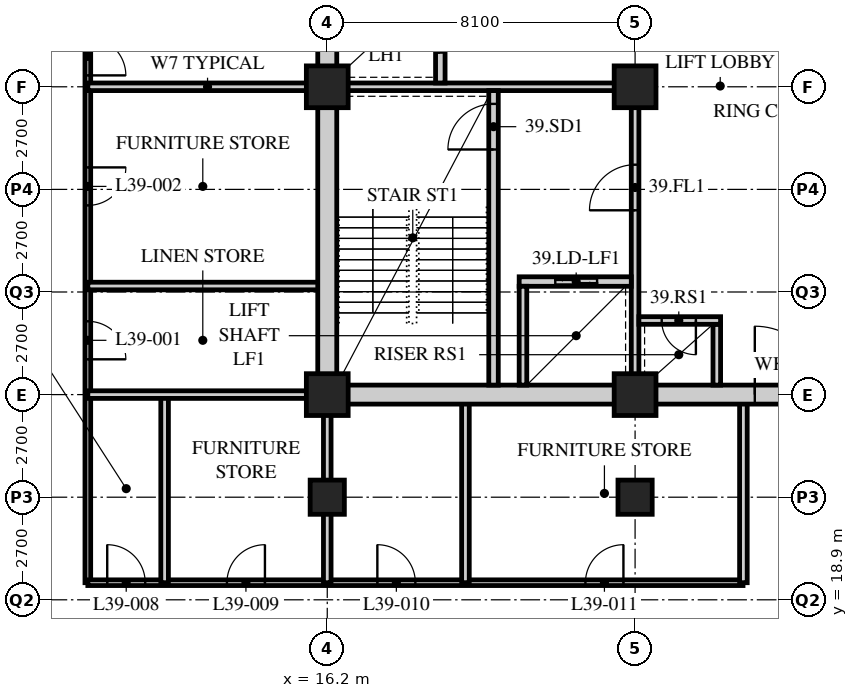
"""IFC4 building model, lengths in metres.
Left out: names, types, materials, properties, quantities, classifications, styles, units other than length and angle.
Written with IfcOpenShell. Run it as: python <this file> out.ifc"""

import sys

from ifc_helpers import new_model, si_unit, direction, frame, frame_2d, origin, origin_2d, place, context, subcontext, project, spatial, rectangle, hollow_rectangle, extrude, element, fill, save


model = new_model("IFC4")
c1 = context("Model", 3, precision=1e-05, world=origin(), true_north=direction((0.0, 1.0)))
c2 = subcontext(c1, "Body", "Model", "MODEL_VIEW")
j1 = project(units=[si_unit("LENGTHUNIT", "METRE"), si_unit("PLANEANGLEUNIT", "RADIAN")], contexts=[c1])
p1 = place(None, origin())
s1 = spatial("IfcSite", under=j1, at=p1, CompositionType="ELEMENT")
p2 = place(p1, origin())
s2 = spatial("IfcBuilding", under=s1, at=p2, CompositionType="ELEMENT")
p3 = place(p2, frame((0.0, 0.0, 151.0)))
s3 = spatial("IfcBuildingStorey", under=s2, at=p3, CompositionType="ELEMENT", Elevation=151.0)
p4 = place(p3, frame((16.2, 21.6, 0.0), z_axis=(0.0, 0.0, 1.0), x_axis=(1.0, 0.0, 0.0)))
e1 = element("IfcColumn", 1, at=p4, inside=s3, PredefinedType="COLUMN", context=c2, shape_type="SweptSolid", body=[
    extrude(hollow_rectangle(XDim=0.9, YDim=0.9, WallThickness=0.1, at=origin_2d()), origin(), (0.0, 0.0, 1.0), 3.4),
])
for number, where, z_axis, x_axis in (
    (2, (16.2, 24.3, 0.0), (0.0, 0.0, 1.0), (1.0, 0.0, 0.0)),
    (3, (16.2, 32.4, 0.0), (0.0, 0.0, 1.0), (1.0, 0.0, 0.0)),
):
    element("IfcColumn", number, at=place(p3, frame(where, z_axis=z_axis, x_axis=x_axis)), inside=s3, PredefinedType="COLUMN", context=c2, shape_type="SweptSolid", body=[
        extrude(hollow_rectangle(XDim=1.1, YDim=1.1, WallThickness=0.1, at=origin_2d()), origin(), (0.0, 0.0, 1.0), 3.4),
    ])
p5 = place(p3, frame((24.3, 21.6, 0.0), z_axis=(0.0, 0.0, 1.0), x_axis=(1.0, 0.0, 0.0)))
e4 = element("IfcColumn", 4, at=p5, inside=s3, PredefinedType="COLUMN", context=c2, shape_type="SweptSolid", body=[
    extrude(hollow_rectangle(XDim=0.9, YDim=0.9, WallThickness=0.1, at=origin_2d()), origin(), (0.0, 0.0, 1.0), 3.4),
])
for number, where, z_axis, x_axis in (
    (5, (24.3, 24.3, 0.0), (0.0, 0.0, 1.0), (1.0, 0.0, 0.0)),
    (6, (24.3, 32.4, 0.0), (0.0, 0.0, 1.0), (1.0, 0.0, 0.0)),
):
    element("IfcColumn", number, at=place(p3, frame(where, z_axis=z_axis, x_axis=x_axis)), inside=s3, PredefinedType="COLUMN", context=c2, shape_type="SweptSolid", body=[
        extrude(hollow_rectangle(XDim=1.1, YDim=1.1, WallThickness=0.1, at=origin_2d()), origin(), (0.0, 0.0, 1.0), 3.4),
    ])
p6 = place(p3, frame((9.9, 44.1, 0.0), z_axis=(0.0, 0.0, 1.0), x_axis=(0.0, -1.0, 0.0)))
e7 = element("IfcWall", 7, at=p6, inside=s3, PredefinedType="PARTITIONING", context=c2, shape_type="SweptSolid", body=[
    extrude(rectangle(XDim=24.75, YDim=0.15, at=frame_2d((12.375, 0.0))), origin(), (0.0, 0.0, 1.0), 3.19),
])
p7 = place(p6, frame((17.871, 0.0, 0.0)))
e8 = element("IfcOpeningElement", 8, at=p7, cuts=e7, PredefinedType="OPENING", context=c2, shape_type="SweptSolid", body=[
    extrude(rectangle(XDim=1.0, YDim=2.1, at=frame_2d((0.5, 1.05))), frame((0.0, 0.085, 0.0), z_axis=(0.0, -1.0, 0.0), x_axis=(1.0, 0.0, 0.0)), (0.0, 0.0, 1.0), 0.17),
])
p8 = place(p6, frame((13.821, 0.0, 0.0)))
e9 = element("IfcOpeningElement", 9, at=p8, cuts=e7, PredefinedType="OPENING", context=c2, shape_type="SweptSolid", body=[
    extrude(rectangle(XDim=1.0, YDim=2.1, at=frame_2d((0.5, 1.05))), frame((0.0, 0.085, 0.0), z_axis=(0.0, -1.0, 0.0), x_axis=(1.0, 0.0, 0.0)), (0.0, 0.0, 1.0), 0.17),
])
p9 = place(p6, frame((10.4, 0.0, 0.0)))
e10 = element("IfcOpeningElement", 10, at=p9, cuts=e7, PredefinedType="OPENING", context=c2, shape_type="SweptSolid", body=[
    extrude(rectangle(XDim=1.0, YDim=2.1, at=frame_2d((0.5, 1.05))), frame((0.0, 0.085, 0.0), z_axis=(0.0, -1.0, 0.0), x_axis=(1.0, 0.0, 0.0)), (0.0, 0.0, 1.0), 0.17),
])
p10 = place(p6, frame((6.35, 0.0, 0.0)))
e11 = element("IfcOpeningElement", 11, at=p10, cuts=e7, PredefinedType="OPENING", context=c2, shape_type="SweptSolid", body=[
    extrude(rectangle(XDim=1.0, YDim=2.1, at=frame_2d((0.5, 1.05))), frame((0.0, 0.085, 0.0), z_axis=(0.0, -1.0, 0.0), x_axis=(1.0, 0.0, 0.0)), (0.0, 0.0, 1.0), 0.17),
])
p11 = place(p3, frame((9.9, 19.35, 0.0), z_axis=(0.0, 0.0, 1.0), x_axis=(1.0, 0.0, 0.0)))
e12 = element("IfcWall", 12, at=p11, inside=s3, PredefinedType="PARTITIONING", context=c2, shape_type="SweptSolid", body=[
    extrude(rectangle(XDim=17.24, YDim=0.15, at=frame_2d((8.62, 0.0))), origin(), (0.0, 0.0, 1.0), 3.19),
])
p12 = place(p11, frame((0.51, 0.0, 0.0)))
e13 = element("IfcOpeningElement", 13, at=p12, cuts=e12, PredefinedType="OPENING", context=c2, shape_type="SweptSolid", body=[
    extrude(rectangle(XDim=1.0, YDim=2.1, at=frame_2d((0.5, 1.05))), frame((0.0, 0.085, 0.0), z_axis=(0.0, -1.0, 0.0), x_axis=(1.0, 0.0, 0.0)), (0.0, 0.0, 1.0), 0.17),
])
p13 = place(p11, frame((3.66, 0.0, 0.0)))
e14 = element("IfcOpeningElement", 14, at=p13, cuts=e12, PredefinedType="OPENING", context=c2, shape_type="SweptSolid", body=[
    extrude(rectangle(XDim=1.0, YDim=2.1, at=frame_2d((0.5, 1.05))), frame((0.0, 0.085, 0.0), z_axis=(0.0, -1.0, 0.0), x_axis=(1.0, 0.0, 0.0)), (0.0, 0.0, 1.0), 0.17),
])
p14 = place(p11, frame((7.618, 0.0, 0.0)))
e15 = element("IfcOpeningElement", 15, at=p14, cuts=e12, PredefinedType="OPENING", context=c2, shape_type="SweptSolid", body=[
    extrude(rectangle(XDim=1.0, YDim=2.1, at=frame_2d((0.5, 1.05))), frame((0.0, 0.085, 0.0), z_axis=(0.0, -1.0, 0.0), x_axis=(1.0, 0.0, 0.0)), (0.0, 0.0, 1.0), 0.17),
])
p15 = place(p11, frame((13.093, 0.0, 0.0)))
e16 = element("IfcOpeningElement", 16, at=p15, cuts=e12, PredefinedType="OPENING", context=c2, shape_type="SweptSolid", body=[
    extrude(rectangle(XDim=1.0, YDim=2.1, at=frame_2d((0.5, 1.05))), frame((0.0, 0.085, 0.0), z_axis=(0.0, -1.0, 0.0), x_axis=(1.0, 0.0, 0.0)), (0.0, 0.0, 1.0), 0.17),
])
for number, where, z_axis, x_axis in (
    (17, (9.9, 32.4, 0.0), (0.0, 0.0, 1.0), (1.0, 0.0, 0.0)),
    (18, (9.9, 27.157, 0.0), (0.0, 0.0, 1.0), (1.0, 0.0, 0.0)),
):
    element("IfcWall", number, at=place(p3, frame(where, z_axis=z_axis, x_axis=x_axis)), inside=s3, PredefinedType="SOLIDWALL", context=c2, shape_type="SweptSolid", body=[
        extrude(rectangle(XDim=6.3, YDim=0.2, at=frame_2d((3.15, 0.0))), origin(), (0.0, 0.0, 1.0), 3.19),
    ])
p16 = place(p3, frame((16.2, 19.35, 0.0), z_axis=(0.0, 0.0, 1.0), x_axis=(0.0, 1.0, 0.0)))
e19 = element("IfcWall", 19, at=p16, inside=s3, PredefinedType="SOLIDWALL", context=c2, shape_type="SweptSolid", body=[
    extrude(rectangle(XDim=4.95, YDim=0.2, at=frame_2d((2.475, 0.0))), origin(), (0.0, 0.0, 1.0), 2.42),
])
for number, where, z_axis, x_axis in (
    (20, (11.92, 19.35, 0.0), (0.0, 0.0, 1.0), (0.0, 1.0, 0.0)),
    (21, (19.836, 19.35, 0.0), (0.0, 0.0, 1.0), (0.0, 1.0, 0.0)),
    (22, (27.15, 19.35, 0.0), (0.0, 0.0, 1.0), (0.0, 1.0, 0.0)),
):
    element("IfcWall", number, at=place(p3, frame(where, z_axis=z_axis, x_axis=x_axis)), inside=s3, PredefinedType="SOLIDWALL", context=c2, shape_type="SweptSolid", body=[
        extrude(rectangle(XDim=4.95, YDim=0.2, at=frame_2d((2.475, 0.0))), origin(), (0.0, 0.0, 1.0), 3.19),
    ])
p17 = place(p3, frame((9.9, 24.3, 0.0), z_axis=(0.0, 0.0, 1.0), x_axis=(1.0, 0.0, 0.0)))
e23 = element("IfcWall", 23, at=p17, inside=s3, PredefinedType="SOLIDWALL", context=c2, shape_type="SweptSolid", body=[
    extrude(rectangle(XDim=6.3, YDim=0.2, at=frame_2d((3.15, 0.0))), origin(), (0.0, 0.0, 1.0), 3.19),
])
p18 = place(p3, frame((15.95, 24.3, 0.0), z_axis=(0.0, 0.0, 1.0), x_axis=(1.0, 0.0, 0.0)))
e24 = element("IfcWall", 24, at=p18, inside=s3, PredefinedType="SOLIDWALL", context=c2, shape_type="SweptSolid", body=[
    extrude(rectangle(XDim=24.8, YDim=0.5, at=frame_2d((12.4, 0.0))), origin(), (0.0, 0.0, 1.0), 2.42),
])
p19 = place(p18, frame((11.5, 0.0, 0.0)))
e25 = element("IfcOpeningElement", 25, at=p19, cuts=e24, PredefinedType="OPENING", context=c2, shape_type="SweptSolid", body=[
    extrude(rectangle(XDim=1.8, YDim=2.4, at=frame_2d((0.9, 1.2))), frame((0.0, 0.26, 0.0), z_axis=(0.0, -1.0, 0.0), x_axis=(1.0, 0.0, 0.0)), (0.0, 0.0, 1.0), 0.52),
])
p20 = place(p3, frame((16.2, 24.55, 0.0), z_axis=(0.0, 0.0, 1.0), x_axis=(0.0, 1.0, 0.0)))
e26 = element("IfcWall", 26, at=p20, inside=s3, PredefinedType="SOLIDWALL", context=c2, shape_type="SweptSolid", body=[
    extrude(rectangle(XDim=15.7, YDim=0.5, at=frame_2d((7.85, 0.0))), origin(), (0.0, 0.0, 1.0), 2.42),
])
p21 = place(p3, frame((16.45, 32.4, 0.0), z_axis=(0.0, 0.0, 1.0), x_axis=(1.0, 0.0, 0.0)))
e27 = element("IfcWall", 27, at=p21, inside=s3, PredefinedType="SOLIDWALL", context=c2, shape_type="SweptSolid", body=[
    extrude(rectangle(XDim=7.95, YDim=0.2, at=frame_2d((3.975, 0.0))), origin(), (0.0, 0.0, 1.0), 2.578),
])
p22 = place(p3, frame((24.3, 24.55, 0.0), z_axis=(0.0, 0.0, 1.0), x_axis=(0.0, 1.0, 0.0)))
e28 = element("IfcWall", 28, at=p22, inside=s3, PredefinedType="SOLIDWALL", context=c2, shape_type="SweptSolid", body=[
    extrude(rectangle(XDim=7.75, YDim=0.2, at=frame_2d((3.875, 0.0))), origin(), (0.0, 0.0, 1.0), 2.578),
])
p23 = place(p22, frame((4.6, 0.0, 0.0)))
e29 = element("IfcOpeningElement", 29, at=p23, cuts=e28, PredefinedType="OPENING", context=c2, shape_type="SweptSolid", body=[
    extrude(rectangle(XDim=1.2, YDim=2.1, at=frame_2d((0.6, 1.05))), frame((0.0, 0.11, 0.0), z_axis=(0.0, -1.0, 0.0), x_axis=(1.0, 0.0, 0.0)), (0.0, 0.0, 1.0), 0.22),
])
p24 = place(p3, frame((20.575, 24.55, 0.0), z_axis=(0.0, 0.0, 1.0), x_axis=(0.0, 1.0, 0.0)))
e30 = element("IfcWall", 30, at=p24, inside=s3, PredefinedType="SOLIDWALL", context=c2, shape_type="SweptSolid", body=[
    extrude(rectangle(XDim=7.75, YDim=0.25, at=frame_2d((3.875, 0.0))), origin(), (0.0, 0.0, 1.0), 3.19),
])
p25 = place(p24, frame((6.2, 0.0, 0.0)))
e31 = element("IfcOpeningElement", 31, at=p25, cuts=e30, PredefinedType="OPENING", context=c2, shape_type="SweptSolid", body=[
    extrude(rectangle(XDim=1.2, YDim=2.1, at=frame_2d((0.6, 1.05))), frame((0.0, 0.135, 0.0), z_axis=(0.0, -1.0, 0.0), x_axis=(1.0, 0.0, 0.0)), (0.0, 0.0, 1.0), 0.27),
])
p26 = place(p3, frame((21.25, 27.275, 0.0), z_axis=(0.0, 0.0, 1.0), x_axis=(1.0, 0.0, 0.0)))
e32 = element("IfcWall", 32, at=p26, inside=s3, PredefinedType="SOLIDWALL", context=c2, shape_type="SweptSolid", body=[
    extrude(rectangle(XDim=2.95, YDim=0.25, at=frame_2d((1.475, 0.0))), origin(), (0.0, 0.0, 1.0), 3.19),
])
p27 = place(p26, frame((0.95, 0.0, 0.0)))
e33 = element("IfcOpeningElement", 33, at=p27, cuts=e32, PredefinedType="OPENING", context=c2, shape_type="SweptSolid", body=[
    extrude(rectangle(XDim=1.1, YDim=2.4, at=frame_2d((0.55, 1.2))), frame((0.0, 0.135, 0.0), z_axis=(0.0, -1.0, 0.0), x_axis=(1.0, 0.0, 0.0)), (0.0, 0.0, 1.0), 0.27),
])
p28 = place(p3, frame((21.35, 24.55, 0.0), z_axis=(0.0, 0.0, 1.0), x_axis=(0.0, 1.0, 0.0)))
e34 = element("IfcWall", 34, at=p28, inside=s3, PredefinedType="SOLIDWALL", context=c2, shape_type="SweptSolid", body=[
    extrude(rectangle(XDim=2.6, YDim=0.2, at=frame_2d((1.3, 0.0))), origin(), (0.0, 0.0, 1.0), 3.19),
])
p29 = place(p3, frame((19.175, 32.5, 0.0), z_axis=(0.0, 0.0, 1.0), x_axis=(0.0, 1.0, 0.0)))
e35 = element("IfcWall", 35, at=p29, inside=s3, PredefinedType="SOLIDWALL", context=c2, shape_type="SweptSolid", body=[
    extrude(rectangle(XDim=7.75, YDim=0.25, at=frame_2d((3.875, 0.0))), origin(), (0.0, 0.0, 1.0), 3.19),
])
p30 = place(p29, frame((0.8, 0.0, 0.0)))
e36 = element("IfcOpeningElement", 36, at=p30, cuts=e35, PredefinedType="OPENING", context=c2, shape_type="SweptSolid", body=[
    extrude(rectangle(XDim=1.1, YDim=2.4, at=frame_2d((0.55, 1.2))), frame((0.0, 0.135, 0.0), z_axis=(0.0, -1.0, 0.0), x_axis=(1.0, 0.0, 0.0)), (0.0, 0.0, 1.0), 0.27),
])
p31 = place(p29, frame((3.4, 0.0, 0.0)))
e37 = element("IfcOpeningElement", 37, at=p31, cuts=e35, PredefinedType="OPENING", context=c2, shape_type="SweptSolid", body=[
    extrude(rectangle(XDim=1.1, YDim=2.4, at=frame_2d((0.55, 1.2))), frame((0.0, 0.135, 0.0), z_axis=(0.0, -1.0, 0.0), x_axis=(1.0, 0.0, 0.0)), (0.0, 0.0, 1.0), 0.27),
])
p32 = place(p29, frame((6.0, 0.0, 0.0)))
e38 = element("IfcOpeningElement", 38, at=p32, cuts=e35, PredefinedType="OPENING", context=c2, shape_type="SweptSolid", body=[
    extrude(rectangle(XDim=1.1, YDim=2.4, at=frame_2d((0.55, 1.2))), frame((0.0, 0.135, 0.0), z_axis=(0.0, -1.0, 0.0), x_axis=(1.0, 0.0, 0.0)), (0.0, 0.0, 1.0), 0.27),
])
p33 = place(p3, frame((26.45, 24.55, 0.0), z_axis=(0.0, 0.0, 1.0), x_axis=(0.0, 1.0, 0.0)))
e39 = element("IfcWall", 39, at=p33, inside=s3, PredefinedType="SOLIDWALL", context=c2, shape_type="SweptSolid", body=[
    extrude(rectangle(XDim=1.6, YDim=0.2, at=frame_2d((0.8, 0.0))), origin(), (0.0, 0.0, 1.0), 3.19),
])
p34 = place(p3, frame((24.4, 26.25, 0.0), z_axis=(0.0, 0.0, 1.0), x_axis=(1.0, 0.0, 0.0)))
e40 = element("IfcWall", 40, at=p34, inside=s3, PredefinedType="SOLIDWALL", context=c2, shape_type="SweptSolid", body=[
    extrude(rectangle(XDim=2.15, YDim=0.2, at=frame_2d((1.075, 0.0))), origin(), (0.0, 0.0, 1.0), 3.19),
])
p35 = place(p34, frame((0.6, 0.0, 0.0)))
e41 = element("IfcOpeningElement", 41, at=p35, cuts=e40, PredefinedType="OPENING", context=c2, shape_type="SweptSolid", body=[
    extrude(rectangle(XDim=0.9, YDim=2.1, at=frame_2d((0.45, 1.05))), frame((0.0, 0.11, 0.0), z_axis=(0.0, -1.0, 0.0), x_axis=(1.0, 0.0, 0.0)), (0.0, 0.0, 1.0), 0.22),
])
p36 = place(p7, origin())
e42 = element("IfcDoor", 42, at=p36, inside=s3, OperationType="SINGLE_SWING_RIGHT", PredefinedType="DOOR", context=c2, shape_type="SweptSolid", body=[
    extrude(rectangle(XDim=1.0, YDim=2.1, at=frame_2d((0.5, 1.05))), frame((0.0, 0.025, 0.0), z_axis=(0.0, -1.0, 0.0), x_axis=(1.0, 0.0, 0.0)), (0.0, 0.0, 1.0), 0.05),
])
fill(e8, e42)
p37 = place(p8, origin())
e43 = element("IfcDoor", 43, at=p37, inside=s3, OperationType="SINGLE_SWING_LEFT", PredefinedType="DOOR", context=c2, shape_type="SweptSolid", body=[
    extrude(rectangle(XDim=1.0, YDim=2.1, at=frame_2d((0.5, 1.05))), frame((0.0, 0.025, 0.0), z_axis=(0.0, -1.0, 0.0), x_axis=(1.0, 0.0, 0.0)), (0.0, 0.0, 1.0), 0.05),
])
fill(e9, e43)
p38 = place(p9, origin())
e44 = element("IfcDoor", 44, at=p38, inside=s3, OperationType="SINGLE_SWING_RIGHT", PredefinedType="DOOR", context=c2, shape_type="SweptSolid", body=[
    extrude(rectangle(XDim=1.0, YDim=2.1, at=frame_2d((0.5, 1.05))), frame((0.0, 0.025, 0.0), z_axis=(0.0, -1.0, 0.0), x_axis=(1.0, 0.0, 0.0)), (0.0, 0.0, 1.0), 0.05),
])
fill(e10, e44)
p39 = place(p12, origin())
e45 = element("IfcDoor", 45, at=p39, inside=s3, OperationType="SINGLE_SWING_LEFT", PredefinedType="DOOR", context=c2, shape_type="SweptSolid", body=[
    extrude(rectangle(XDim=1.0, YDim=2.1, at=frame_2d((0.5, 1.05))), frame((0.0, 0.025, 0.0), z_axis=(0.0, -1.0, 0.0), x_axis=(1.0, 0.0, 0.0)), (0.0, 0.0, 1.0), 0.05),
])
fill(e13, e45)
p40 = place(p13, origin())
e46 = element("IfcDoor", 46, at=p40, inside=s3, OperationType="SINGLE_SWING_RIGHT", PredefinedType="DOOR", context=c2, shape_type="SweptSolid", body=[
    extrude(rectangle(XDim=1.0, YDim=2.1, at=frame_2d((0.5, 1.05))), frame((0.0, 0.025, 0.0), z_axis=(0.0, -1.0, 0.0), x_axis=(1.0, 0.0, 0.0)), (0.0, 0.0, 1.0), 0.05),
])
fill(e14, e46)
p41 = place(p14, origin())
e47 = element("IfcDoor", 47, at=p41, inside=s3, OperationType="SINGLE_SWING_LEFT", PredefinedType="DOOR", context=c2, shape_type="SweptSolid", body=[
    extrude(rectangle(XDim=1.0, YDim=2.1, at=frame_2d((0.5, 1.05))), frame((0.0, 0.025, 0.0), z_axis=(0.0, -1.0, 0.0), x_axis=(1.0, 0.0, 0.0)), (0.0, 0.0, 1.0), 0.05),
])
fill(e15, e47)
p42 = place(p15, origin())
e48 = element("IfcDoor", 48, at=p42, inside=s3, OperationType="SINGLE_SWING_RIGHT", PredefinedType="DOOR", context=c2, shape_type="SweptSolid", body=[
    extrude(rectangle(XDim=1.0, YDim=2.1, at=frame_2d((0.5, 1.05))), frame((0.0, 0.025, 0.0), z_axis=(0.0, -1.0, 0.0), x_axis=(1.0, 0.0, 0.0)), (0.0, 0.0, 1.0), 0.05),
])
fill(e16, e48)
p43 = place(p25, origin())
e49 = element("IfcDoor", 49, at=p43, inside=s3, OperationType="SINGLE_SWING_LEFT", PredefinedType="DOOR", context=c2, shape_type="SweptSolid", body=[
    extrude(rectangle(XDim=1.2, YDim=2.1, at=frame_2d((0.6, 1.05))), frame((0.0, 0.025, 0.0), z_axis=(0.0, -1.0, 0.0), x_axis=(1.0, 0.0, 0.0)), (0.0, 0.0, 1.0), 0.05),
])
fill(e31, e49)
p44 = place(p23, origin())
e50 = element("IfcDoor", 50, at=p44, inside=s3, OperationType="SINGLE_SWING_LEFT", PredefinedType="DOOR", context=c2, shape_type="SweptSolid", body=[
    extrude(rectangle(XDim=1.2, YDim=2.1, at=frame_2d((0.6, 1.05))), frame((0.0, 0.025, 0.0), z_axis=(0.0, -1.0, 0.0), x_axis=(1.0, 0.0, 0.0)), (0.0, 0.0, 1.0), 0.05),
])
fill(e29, e50)
p45 = place(p35, origin())
e51 = element("IfcDoor", 51, at=p45, inside=s3, OperationType="SINGLE_SWING_LEFT", PredefinedType="DOOR", context=c2, shape_type="SweptSolid", body=[
    extrude(rectangle(XDim=0.9, YDim=2.1, at=frame_2d((0.45, 1.05))), frame((0.0, 0.025, 0.0), z_axis=(0.0, -1.0, 0.0), x_axis=(1.0, 0.0, 0.0)), (0.0, 0.0, 1.0), 0.05),
])
fill(e41, e51)
p46 = place(p30, origin())
e52 = element("IfcDoor", 52, at=p46, inside=s3, OperationType="DOUBLE_DOOR_SLIDING", PredefinedType="DOOR", context=c2, shape_type="SweptSolid", body=[
    extrude(rectangle(XDim=1.1, YDim=2.4, at=frame_2d((0.55, 1.2))), frame((0.0, 0.025, 0.0), z_axis=(0.0, -1.0, 0.0), x_axis=(1.0, 0.0, 0.0)), (0.0, 0.0, 1.0), 0.05),
])
fill(e36, e52)
p47 = place(p27, origin())
e53 = element("IfcDoor", 53, at=p47, inside=s3, OperationType="DOUBLE_DOOR_SLIDING", PredefinedType="DOOR", context=c2, shape_type="SweptSolid", body=[
    extrude(rectangle(XDim=1.1, YDim=2.4, at=frame_2d((0.55, 1.2))), frame((0.0, 0.025, 0.0), z_axis=(0.0, -1.0, 0.0), x_axis=(1.0, 0.0, 0.0)), (0.0, 0.0, 1.0), 0.05),
])
fill(e33, e53)
p48 = place(p19, origin())
e54 = element("IfcDoor", 54, at=p48, inside=s3, OperationType="DOUBLE_DOOR_SINGLE_SWING", PredefinedType="DOOR", context=c2, shape_type="SweptSolid", body=[
    extrude(rectangle(XDim=1.8, YDim=2.4, at=frame_2d((0.9, 1.2))), frame((0.0, 0.025, 0.0), z_axis=(0.0, -1.0, 0.0), x_axis=(1.0, 0.0, 0.0)), (0.0, 0.0, 1.0), 0.05),
])
fill(e25, e54)
save(model, sys.argv[1])
